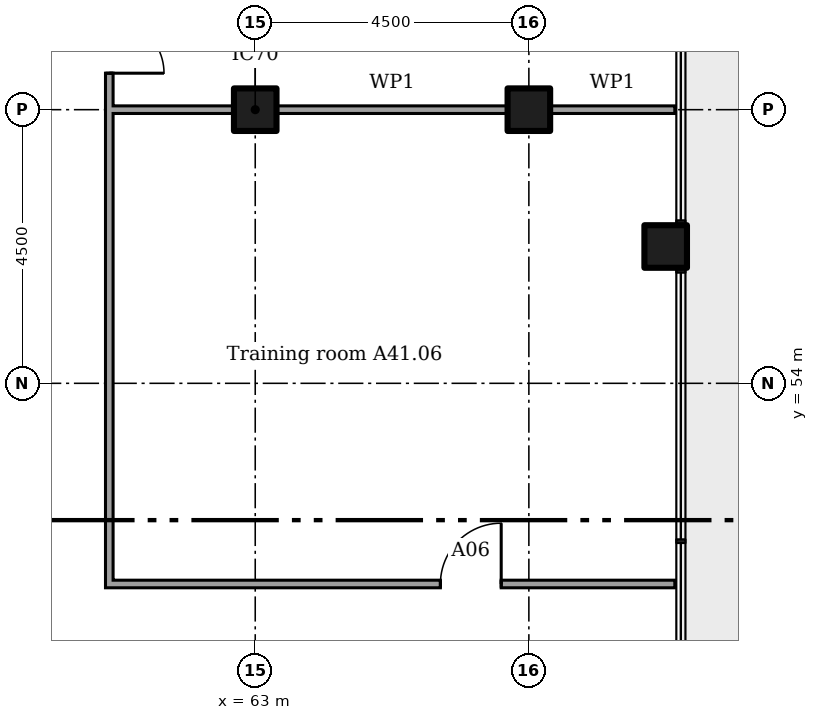
"""IFC4 building model, lengths in metres.
Left out: names, types, materials, properties, quantities, classifications, styles, units other than length and angle.
Written with IfcOpenShell. Run it as: python <this file> out.ifc"""

import sys

from ifc_helpers import new_model, si_unit, direction, frame, frame_2d, origin, origin_2d, place, context, subcontext, project, spatial, rectangle, extrude, element, fill, save


model = new_model("IFC4")
c1 = context("Model", 3, precision=1e-05, world=origin(), true_north=direction((0.0, 1.0)))
c2 = subcontext(c1, "Body", "Model", "MODEL_VIEW")
j1 = project(units=[si_unit("LENGTHUNIT", "METRE"), si_unit("PLANEANGLEUNIT", "RADIAN")], contexts=[c1])
p1 = place(None, origin())
s1 = spatial("IfcSite", under=j1, at=p1, CompositionType="ELEMENT")
p2 = place(p1, origin())
s2 = spatial("IfcBuilding", under=s1, at=p2, CompositionType="ELEMENT")
p3 = place(p2, frame((0.0, 0.0, 165.4)))
s3 = spatial("IfcBuildingStorey", under=s2, at=p3, CompositionType="ELEMENT", Elevation=165.4)
for number, where in (
    (1, (63.0, 58.5, 0.0)),
    (2, (67.5, 58.5, 0.0)),
    (3, (69.75, 56.25, 0.0)),
):
    element("IfcColumn", number, at=place(p3, frame(where)), inside=s3, PredefinedType="COLUMN", context=c2, shape_type="SweptSolid", body=[
        extrude(rectangle(XDim=0.7, YDim=0.7, at=origin_2d()), origin(), (0.0, 0.0, 1.0), 3.6),
    ])
p4 = place(p3, frame((60.538, 50.7, 0.0)))
e4 = element("IfcWall", 4, at=p4, inside=s3, PredefinedType="PARTITIONING", context=c2, shape_type="SweptSolid", body=[
    extrude(rectangle(XDim=9.362, YDim=0.125, at=frame_2d((4.681, 0.0))), origin(), (0.0, 0.0, 1.0), 3.45),
])
p5 = place(p4, frame((5.508, 0.0, 0.0)))
e5 = element("IfcOpeningElement", 5, at=p5, cuts=e4, PredefinedType="OPENING", context=c2, shape_type="SweptSolid", body=[
    extrude(rectangle(XDim=1.0, YDim=2.1, at=frame_2d((0.5, 1.05))), frame((0.0, 0.073, 0.0), z_axis=(0.0, -1.0, 0.0), x_axis=(1.0, 0.0, 0.0)), (0.0, 0.0, 1.0), 0.145),
])
p6 = place(p3, frame((60.6, 58.5, 0.0)))
e6 = element("IfcWall", 6, at=p6, inside=s3, PredefinedType="PARTITIONING", context=c2, shape_type="SweptSolid", body=[
    extrude(rectangle(XDim=2.05, YDim=0.125, at=frame_2d((1.025, 0.0))), origin(), (0.0, 0.0, 1.0), 2.676),
])
p7 = place(p3, frame((63.35, 58.5, 0.0)))
e7 = element("IfcWall", 7, at=p7, inside=s3, PredefinedType="PARTITIONING", context=c2, shape_type="SweptSolid", body=[
    extrude(rectangle(XDim=3.8, YDim=0.125, at=frame_2d((1.9, 0.0))), origin(), (0.0, 0.0, 1.0), 2.676),
])
p8 = place(p3, frame((67.85, 58.5, 0.0)))
e8 = element("IfcWall", 8, at=p8, inside=s3, PredefinedType="PARTITIONING", context=c2, shape_type="SweptSolid", body=[
    extrude(rectangle(XDim=2.05, YDim=0.125, at=frame_2d((1.025, 0.0))), origin(), (0.0, 0.0, 1.0), 2.676),
])
p9 = place(p3, frame((60.6, 50.762, 0.0), z_axis=(0.0, 0.0, 1.0), x_axis=(0.0, 1.0, 0.0)))
e9 = element("IfcWall", 9, at=p9, inside=s3, PredefinedType="PARTITIONING", context=c2, shape_type="SweptSolid", body=[
    extrude(rectangle(XDim=9.775, YDim=0.125, at=frame_2d((4.888, 0.0))), origin(), (0.0, 0.0, 1.0), 3.45),
])
p10 = place(p9, frame((8.337, 0.0, 0.0)))
e10 = element("IfcOpeningElement", 10, at=p10, cuts=e9, PredefinedType="OPENING", context=c2, shape_type="SweptSolid", body=[
    extrude(rectangle(XDim=0.9, YDim=2.1, at=frame_2d((0.45, 1.05))), frame((0.0, 0.073, 0.0), z_axis=(0.0, -1.0, 0.0), x_axis=(1.0, 0.0, 0.0)), (0.0, 0.0, 1.0), 0.145),
])
p11 = place(p5, origin())
e11 = element("IfcDoor", 11, at=p11, inside=s3, OperationType="SINGLE_SWING_LEFT", PredefinedType="DOOR", context=c2, shape_type="SweptSolid", body=[
    extrude(rectangle(XDim=1.0, YDim=2.1, at=frame_2d((0.5, 1.05))), frame((0.0, 0.025, 0.0), z_axis=(0.0, -1.0, 0.0), x_axis=(1.0, 0.0, 0.0)), (0.0, 0.0, 1.0), 0.05),
])
fill(e5, e11)
p12 = place(p10, frame((0.9, 0.0, 0.0), x_axis=(-1.0, 0.0, 0.0)))
e12 = element("IfcDoor", 12, at=p12, inside=s3, OperationType="SINGLE_SWING_LEFT", PredefinedType="DOOR", context=c2, shape_type="SweptSolid", body=[
    extrude(rectangle(XDim=0.9, YDim=2.1, at=frame_2d((0.45, 1.05))), frame((0.0, 0.025, 0.0), z_axis=(0.0, -1.0, 0.0), x_axis=(1.0, 0.0, 0.0)), (0.0, 0.0, 1.0), 0.05),
])
fill(e10, e12)
save(model, sys.argv[1])
